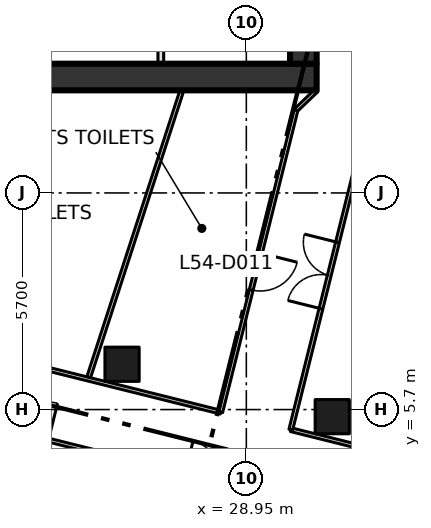
"""IFC4 building model, lengths in metres.
Left out: names, types, materials, properties, quantities, classifications, styles, units other than length and angle.
Written with IfcOpenShell. Run it as: python <this file> out.ifc"""

import sys

from ifc_helpers import new_model, si_unit, direction, frame, frame_2d, origin, origin_2d, place, context, subcontext, project, spatial, rectangle, extrude, element, fill, save


model = new_model("IFC4")
c1 = context("Model", 3, precision=1e-05, world=origin(), true_north=direction((0.0, 1.0)))
c2 = subcontext(c1, "Body", "Model", "MODEL_VIEW")
j1 = project(units=[si_unit("LENGTHUNIT", "METRE"), si_unit("PLANEANGLEUNIT", "RADIAN")], contexts=[c1])
p1 = place(None, origin())
s1 = spatial("IfcSite", under=j1, at=p1, CompositionType="ELEMENT")
p2 = place(p1, origin())
s2 = spatial("IfcBuilding", under=s1, at=p2, CompositionType="ELEMENT")
p3 = place(p2, frame((0.0, 0.0, 238.2)))
s3 = spatial("IfcBuildingStorey", under=s2, at=p3, CompositionType="ELEMENT", Elevation=238.2)
for number, where, z_axis, x_axis in (
    (1, (25.68, 6.892, 0.0), (0.0, 0.0, 1.0), (1.0, 0.0, 0.0)),
    (2, (31.211, 5.513, 0.0), (0.0, 0.0, 1.0), (1.0, 0.0, 0.0)),
):
    element("IfcColumn", number, at=place(p3, frame(where, z_axis=z_axis, x_axis=x_axis)), inside=s3, PredefinedType="COLUMN", context=c2, shape_type="SweptSolid", body=[
        extrude(rectangle(XDim=0.9, YDim=0.9, at=origin_2d()), origin(), (0.0, 0.0, 1.0), 4.2),
    ])
p4 = place(p3, frame((8.0, 14.45, -0.3), z_axis=(0.0, 0.0, 1.0), x_axis=(1.0, 0.0, 0.0)))
e3 = element("IfcWall", 3, at=p4, inside=s3, PredefinedType="SHEAR", context=c2, shape_type="SweptSolid", body=[
    extrude(rectangle(XDim=22.8, YDim=0.7, at=frame_2d((11.4, 0.0))), origin(), (0.0, 0.0, 1.0), 4.2),
])
p5 = place(p4, frame((2.3, 0.0, 0.3)))
e4 = element("IfcOpeningElement", 4, at=p5, cuts=e3, PredefinedType="OPENING", context=c2, shape_type="SweptSolid", body=[
    extrude(rectangle(XDim=1.8, YDim=2.1, at=frame_2d((0.9, 1.05))), frame((0.0, 0.36, 0.0), z_axis=(0.0, -1.0, 0.0), x_axis=(1.0, 0.0, 0.0)), (0.0, 0.0, 1.0), 0.72),
])
p6 = place(p3, frame((30.45, 14.8, -0.3), z_axis=(0.0, 0.0, 1.0), x_axis=(0.0, 1.0, 0.0)))
e5 = element("IfcWall", 5, at=p6, inside=s3, PredefinedType="SHEAR", context=c2, shape_type="SweptSolid", body=[
    extrude(rectangle(XDim=20.9, YDim=0.7, at=frame_2d((10.45, 0.0))), origin(), (0.0, 0.0, 1.0), 4.2),
])
p7 = place(p3, frame((26.7, 14.8, 0.0), z_axis=(0.0, 0.0, 1.0), x_axis=(0.0, 1.0, 0.0)))
e6 = element("IfcWall", 6, at=p7, inside=s3, PredefinedType="PARTITIONING", context=c2, shape_type="SweptSolid", body=[
    extrude(rectangle(XDim=2.825, YDim=0.15, at=frame_2d((1.413, 0.0))), origin(), (0.0, 0.0, 1.0), 3.9),
])
p8 = place(p3, frame((8.55, 8.685, 0.0), z_axis=(0.0, 0.0, 1.0), x_axis=(0.970297603286, -0.241914367199, 0.0)))
e7 = element("IfcWall", 7, at=p8, inside=s3, PredefinedType="PARTITIONING", context=c2, shape_type="SweptSolid", body=[
    extrude(rectangle(XDim=50.675, YDim=0.1, at=frame_2d((25.337, 0.0))), origin(), (0.0, 0.0, 1.0), 3.9),
])
p9 = place(p8, frame((35.657, 0.0, 0.0)))
e8 = element("IfcOpeningElement", 8, at=p9, cuts=e7, PredefinedType="OPENING", context=c2, shape_type="SweptSolid", body=[
    extrude(rectangle(XDim=1.8, YDim=2.1, at=frame_2d((0.9, 1.05))), frame((0.0, 0.06, 0.0), z_axis=(0.0, -1.0, 0.0), x_axis=(1.0, 0.0, 0.0)), (0.0, 0.0, 1.0), 0.12),
])
p10 = place(p8, frame((14.657, 0.0, 0.0)))
e9 = element("IfcOpeningElement", 9, at=p10, cuts=e7, PredefinedType="OPENING", context=c2, shape_type="SweptSolid", body=[
    extrude(rectangle(XDim=1.0, YDim=2.1, at=frame_2d((0.5, 1.05))), frame((0.0, 0.06, 0.0), z_axis=(0.0, -1.0, 0.0), x_axis=(1.0, 0.0, 0.0)), (0.0, 0.0, 1.0), 0.12),
])
p11 = place(p8, frame((19.357, 0.0, 0.0)))
e10 = element("IfcOpeningElement", 10, at=p11, cuts=e7, PredefinedType="OPENING", context=c2, shape_type="SweptSolid", body=[
    extrude(rectangle(XDim=1.8, YDim=2.1, at=frame_2d((0.9, 1.05))), frame((0.0, 0.06, 0.0), z_axis=(0.0, -1.0, 0.0), x_axis=(1.0, 0.0, 0.0)), (0.0, 0.0, 1.0), 0.12),
])
p12 = place(p8, frame((5.38, 0.0, 0.0)))
e11 = element("IfcOpeningElement", 11, at=p12, cuts=e7, PredefinedType="OPENING", context=c2, shape_type="SweptSolid", body=[
    extrude(rectangle(XDim=1.0, YDim=2.1, at=frame_2d((0.5, 1.05))), frame((0.0, 0.06, 0.0), z_axis=(0.0, -1.0, 0.0), x_axis=(1.0, 0.0, 0.0)), (0.0, 0.0, 1.0), 0.12),
])
p13 = place(p3, frame((8.988, 10.44, 0.0), z_axis=(0.0, 0.0, 1.0), x_axis=(0.970301223092, -0.241899848006, 0.0)))
e12 = element("IfcWall", 12, at=p13, inside=s3, PredefinedType="PARTITIONING", context=c2, shape_type="SweptSolid", body=[
    extrude(rectangle(XDim=19.879, YDim=0.1, at=frame_2d((9.94, 0.0))), origin(), (0.0, 0.0, 1.0), 3.9),
])
p14 = place(p13, frame((8.861, 0.0, 0.0)))
e13 = element("IfcOpeningElement", 13, at=p14, cuts=e12, PredefinedType="OPENING", context=c2, shape_type="SweptSolid", body=[
    extrude(rectangle(XDim=1.0, YDim=2.1, at=frame_2d((0.5, 1.05))), frame((0.0, 0.06, 0.0), z_axis=(0.0, -1.0, 0.0), x_axis=(1.0, 0.0, 0.0)), (0.0, 0.0, 1.0), 0.12),
])
p15 = place(p3, frame((30.12, 5.171, 0.0), z_axis=(0.0, 0.0, 1.0), x_axis=(0.970298856921, -0.241909338922, 0.0)))
e14 = element("IfcWall", 14, at=p15, inside=s3, PredefinedType="PARTITIONING", context=c2, shape_type="SweptSolid", body=[
    extrude(rectangle(XDim=28.895, YDim=0.1, at=frame_2d((14.448, 0.0))), origin(), (0.0, 0.0, 1.0), 3.9),
])
p16 = place(p15, frame((8.08, 0.0, 0.0)))
e15 = element("IfcOpeningElement", 15, at=p16, cuts=e14, PredefinedType="OPENING", context=c2, shape_type="SweptSolid", body=[
    extrude(rectangle(XDim=1.0, YDim=2.1, at=frame_2d((0.5, 1.05))), frame((0.0, 0.06, 0.0), z_axis=(0.0, -1.0, 0.0), x_axis=(1.0, 0.0, 0.0)), (0.0, 0.0, 1.0), 0.12),
])
p17 = place(p3, frame((30.12, 5.171, 0.0), z_axis=(0.0, 0.0, 1.0), x_axis=(0.241902913229, 0.970300458915, 0.0)))
e16 = element("IfcWall", 16, at=p17, inside=s3, PredefinedType="PARTITIONING", context=c2, shape_type="SweptSolid", body=[
    extrude(rectangle(XDim=8.172, YDim=0.1, at=frame_2d((4.086, 0.0))), origin(), (0.0, 0.0, 1.0), 3.9),
])
p18 = place(p17, frame((3.28, 0.0, 0.0)))
e17 = element("IfcOpeningElement", 17, at=p18, cuts=e16, PredefinedType="OPENING", context=c2, shape_type="SweptSolid", body=[
    extrude(rectangle(XDim=1.8, YDim=2.1, at=frame_2d((0.9, 1.05))), frame((0.0, 0.06, 0.0), z_axis=(0.0, -1.0, 0.0), x_axis=(1.0, 0.0, 0.0)), (0.0, 0.0, 1.0), 0.12),
])
p19 = place(p3, frame((30.259, 13.583, 0.0), z_axis=(0.0, 0.0, 1.0), x_axis=(-0.241841612879, -0.970315739479, 0.0)))
e18 = element("IfcWall", 18, at=p19, inside=s3, PredefinedType="PARTITIONING", context=c2, shape_type="SweptSolid", body=[
    extrude(rectangle(XDim=8.195, YDim=0.1, at=frame_2d((4.098, 0.0))), origin(), (0.0, 0.0, 1.0), 3.9),
])
p20 = place(p19, frame((3.88, 0.0, 0.0)))
e19 = element("IfcOpeningElement", 19, at=p20, cuts=e18, PredefinedType="OPENING", context=c2, shape_type="SweptSolid", body=[
    extrude(rectangle(XDim=1.0, YDim=2.1, at=frame_2d((0.5, 1.05))), frame((0.0, 0.06, 0.0), z_axis=(0.0, -1.0, 0.0), x_axis=(1.0, 0.0, 0.0)), (0.0, 0.0, 1.0), 0.12),
])
p21 = place(p3, frame((30.8, 14.1, 0.0), z_axis=(0.0, 0.0, 1.0), x_axis=(-0.722911025189, -0.690941133281, 0.0)))
e20 = element("IfcWall", 20, at=p21, inside=s3, PredefinedType="PARTITIONING", context=c2, shape_type="SweptSolid", body=[
    extrude(rectangle(XDim=0.748, YDim=0.1, at=frame_2d((0.374, 0.0))), origin(), (0.0, 0.0, 1.0), 3.9),
])
p22 = place(p3, frame((24.803, 6.552, 0.0), z_axis=(0.0, 0.0, 1.0), x_axis=(0.308946255954, 0.951079497693, 0.0)))
e21 = element("IfcWall", 21, at=p22, inside=s3, PredefinedType="PARTITIONING", context=c2, shape_type="SweptSolid", body=[
    extrude(rectangle(XDim=7.936, YDim=0.1, at=frame_2d((3.968, 0.0))), origin(), (0.0, 0.0, 1.0), 3.9),
])
p23 = place(p20, origin())
e22 = element("IfcDoor", 22, at=p23, inside=s3, OperationType="SINGLE_SWING_LEFT", PredefinedType="DOOR", context=c2, shape_type="SweptSolid", body=[
    extrude(rectangle(XDim=1.0, YDim=2.1, at=frame_2d((0.5, 1.05))), frame((0.0, 0.025, 0.0), z_axis=(0.0, -1.0, 0.0), x_axis=(1.0, 0.0, 0.0)), (0.0, 0.0, 1.0), 0.05),
])
fill(e19, e22)
p24 = place(p18, origin())
e23 = element("IfcDoor", 23, at=p24, inside=s3, OperationType="DOUBLE_DOOR_SINGLE_SWING", PredefinedType="DOOR", context=c2, shape_type="SweptSolid", body=[
    extrude(rectangle(XDim=1.8, YDim=2.1, at=frame_2d((0.9, 1.05))), frame((0.0, 0.025, 0.0), z_axis=(0.0, -1.0, 0.0), x_axis=(1.0, 0.0, 0.0)), (0.0, 0.0, 1.0), 0.05),
])
fill(e17, e23)
save(model, sys.argv[1])
